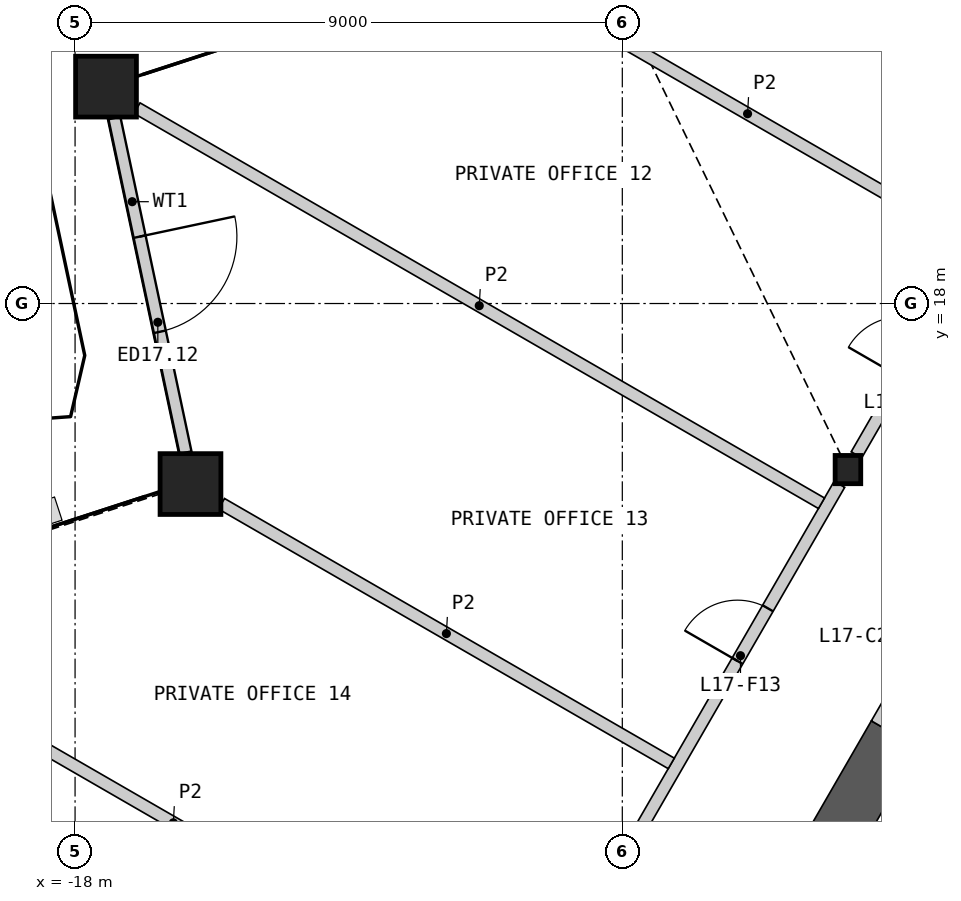
"""IFC4 building model, lengths in metres.
Left out: names, types, materials, properties, quantities, classifications, styles, units other than length and angle.
Written with IfcOpenShell. Run it as: python <this file> out.ifc"""

import sys

from ifc_helpers import new_model, si_unit, direction, frame, frame_2d, origin, origin_2d, place, context, subcontext, project, spatial, rectangle, hollow_rectangle, i_section, extrude, element, fill, save


model = new_model("IFC4")
c1 = context("Model", 3, precision=1e-05, world=origin(), true_north=direction((0.0, 1.0)))
c2 = subcontext(c1, "Body", "Model", "MODEL_VIEW")
j1 = project(units=[si_unit("LENGTHUNIT", "METRE"), si_unit("PLANEANGLEUNIT", "RADIAN")], contexts=[c1])
p1 = place(None, origin())
s1 = spatial("IfcSite", under=j1, at=p1, CompositionType="ELEMENT")
p2 = place(p1, origin())
s2 = spatial("IfcBuilding", under=s1, at=p2, CompositionType="ELEMENT")
p3 = place(p2, frame((0.0, 0.0, 80.4)))
s3 = spatial("IfcBuildingStorey", under=s2, at=p3, CompositionType="ELEMENT", Elevation=80.4)
for number, where, z_axis, x_axis in (
    (1, (-17.491, 21.567, 0.0), (0.0, 0.0, 1.0), (1.0, 0.0, 0.0)),
    (2, (-16.102, 15.031, 0.0), (0.0, 0.0, 1.0), (1.0, 0.0, 0.0)),
):
    element("IfcColumn", number, at=place(p3, frame(where, z_axis=z_axis, x_axis=x_axis)), inside=s3, PredefinedType="COLUMN", context=c2, shape_type="SweptSolid", body=[
        extrude(hollow_rectangle(XDim=1.0, YDim=1.0, WallThickness=0.07, at=origin_2d()), origin(), (0.0, 0.0, 1.0), 4.2),
    ])
p4 = place(p3, frame((-5.289, 15.269, 0.0), z_axis=(0.0, 0.0, 1.0), x_axis=(1.0, 0.0, 0.0)))
e3 = element("IfcColumn", 3, at=p4, inside=s3, PredefinedType="COLUMN", context=c2, shape_type="SweptSolid", body=[
    extrude(i_section(OverallWidth=0.421, OverallDepth=0.465, WebThickness=0.045, FlangeThickness=0.072, at=origin_2d()), origin(), (0.0, 0.0, 1.0), 4.2),
])
p5 = place(p3, frame((-17.353, 21.051, 0.0), z_axis=(0.0, 0.0, 1.0), x_axis=(0.207901831982, -0.978149696242, 0.0)))
e4 = element("IfcWall", 4, at=p5, inside=s3, PredefinedType="SOLIDWALL", context=c2, shape_type="SweptSolid", body=[
    extrude(rectangle(XDim=5.626, YDim=0.2, at=frame_2d((2.813, 0.0))), origin(), (0.0, 0.0, 1.0), 3.189),
])
p6 = place(p5, frame((1.994, 0.0, 0.0)))
e5 = element("IfcOpeningElement", 5, at=p6, cuts=e4, PredefinedType="OPENING", context=c2, shape_type="SweptSolid", body=[
    extrude(rectangle(XDim=1.6, YDim=2.4, at=frame_2d((0.8, 1.2))), frame((0.0, 0.11, 0.0), z_axis=(0.0, -1.0, 0.0), x_axis=(1.0, 0.0, 0.0)), (0.0, 0.0, 1.0), 0.22),
])
p7 = place(p3, frame((-4.514, 10.911, 0.0), z_axis=(0.0, 0.0, 1.0), x_axis=(-0.500006662879, -0.866021556935, 0.0)))
e6 = element("IfcWall", 6, at=p7, inside=s3, PredefinedType="SHEAR", context=c2, shape_type="SweptSolid", body=[
    extrude(rectangle(XDim=7.312, YDim=0.9, at=frame_2d((3.656, 0.0))), origin(), (0.0, 0.0, 1.0), 3.8),
])
p8 = place(p3, frame((-3.414, 12.816, 0.0), z_axis=(0.0, 0.0, 1.0), x_axis=(-0.50002983664, -0.866008176907, 0.0)))
e7 = element("IfcWall", 7, at=p8, inside=s3, PredefinedType="SHEAR", context=c2, shape_type="SweptSolid", body=[
    extrude(rectangle(XDim=2.2, YDim=0.9, at=frame_2d((1.1, 0.0))), origin(), (0.0, 0.0, 1.0), 3.8),
])
p9 = place(p8, frame((0.6, 0.0, 0.0)))
e8 = element("IfcOpeningElement", 8, at=p9, cuts=e7, PredefinedType="OPENING", context=c2, shape_type="SweptSolid", body=[
    extrude(rectangle(XDim=1.0, YDim=2.1, at=frame_2d((0.5, 1.05))), frame((0.0, 0.46, 0.0), z_axis=(0.0, -1.0, 0.0), x_axis=(1.0, 0.0, 0.0)), (0.0, 0.0, 1.0), 0.92),
])
p10 = place(p3, frame((-10.439, 6.35, 0.0), z_axis=(0.0, 0.0, 1.0), x_axis=(0.50001002959, 0.86601961312, 0.0)))
e9 = element("IfcWall", 9, at=p10, inside=s3, PredefinedType="PARTITIONING", context=c2, shape_type="SweptSolid", body=[
    extrude(rectangle(XDim=10.019, YDim=0.2, at=frame_2d((5.009, 0.0))), origin(), (0.0, 0.0, 1.0), 3.8),
])
p11 = place(p10, frame((6.664, 0.0, 0.0)))
e10 = element("IfcOpeningElement", 10, at=p11, cuts=e9, PredefinedType="OPENING", context=c2, shape_type="SweptSolid", body=[
    extrude(rectangle(XDim=1.0, YDim=2.1, at=frame_2d((0.5, 1.05))), frame((0.0, 0.11, 0.0), z_axis=(0.0, -1.0, 0.0), x_axis=(1.0, 0.0, 0.0)), (0.0, 0.0, 1.0), 0.22),
])
p12 = place(p10, frame((1.854, 0.0, 0.0)))
e11 = element("IfcOpeningElement", 11, at=p12, cuts=e9, PredefinedType="OPENING", context=c2, shape_type="SweptSolid", body=[
    extrude(rectangle(XDim=1.0, YDim=2.1, at=frame_2d((0.5, 1.05))), frame((0.0, 0.11, 0.0), z_axis=(0.0, -1.0, 0.0), x_axis=(1.0, 0.0, 0.0)), (0.0, 0.0, 1.0), 0.22),
])
p13 = place(p3, frame((-5.149, 15.511, 0.0), z_axis=(0.0, 0.0, 1.0), x_axis=(0.500001069878, 0.866024786089, 0.0)))
e12 = element("IfcWall", 12, at=p13, inside=s3, PredefinedType="PARTITIONING", context=c2, shape_type="SweptSolid", body=[
    extrude(rectangle(XDim=6.473, YDim=0.2, at=frame_2d((3.236, 0.0))), origin(), (0.0, 0.0, 1.0), 3.8),
])
p14 = place(p13, frame((4.715, 0.0, 0.0)))
e13 = element("IfcOpeningElement", 13, at=p14, cuts=e12, PredefinedType="OPENING", context=c2, shape_type="SweptSolid", body=[
    extrude(rectangle(XDim=1.0, YDim=2.1, at=frame_2d((0.5, 1.05))), frame((0.0, 0.11, 0.0), z_axis=(0.0, -1.0, 0.0), x_axis=(1.0, 0.0, 0.0)), (0.0, 0.0, 1.0), 0.22),
])
p15 = place(p13, frame((1.468, 0.0, 0.0)))
e14 = element("IfcOpeningElement", 14, at=p15, cuts=e12, PredefinedType="OPENING", context=c2, shape_type="SweptSolid", body=[
    extrude(rectangle(XDim=1.0, YDim=2.1, at=frame_2d((0.5, 1.05))), frame((0.0, 0.11, 0.0), z_axis=(0.0, -1.0, 0.0), x_axis=(1.0, 0.0, 0.0)), (0.0, 0.0, 1.0), 0.22),
])
p16 = place(p3, frame((-12.109, 29.659, 0.0), z_axis=(0.0, 0.0, 1.0), x_axis=(0.761767039776, -0.647851045465, 0.0)))
e15 = element("IfcWall", 15, at=p16, inside=s3, PredefinedType="PARTITIONING", context=c2, shape_type="SweptSolid", body=[
    extrude(rectangle(XDim=13.219, YDim=0.2, at=frame_2d((6.609, 0.0))), origin(), (0.0, 0.0, 1.0), 2.885),
])
p17 = place(p3, frame((-16.981, 21.213, 0.0), z_axis=(0.0, 0.0, 1.0), x_axis=(0.866032633092, -0.499987478263, 0.0)))
e16 = element("IfcWall", 16, at=p17, inside=s3, PredefinedType="PARTITIONING", context=c2, shape_type="SweptSolid", body=[
    extrude(rectangle(XDim=12.998, YDim=0.2, at=frame_2d((6.499, 0.0))), origin(), (0.0, 0.0, 1.0), 2.885),
])
p18 = place(p3, frame((-21.947, 12.671, 0.0), z_axis=(0.0, 0.0, 1.0), x_axis=(0.866026729935, -0.499997703033, 0.0)))
e17 = element("IfcWall", 17, at=p18, inside=s3, PredefinedType="PARTITIONING", context=c2, shape_type="SweptSolid", body=[
    extrude(rectangle(XDim=12.848, YDim=0.2, at=frame_2d((6.424, 0.0))), origin(), (0.0, 0.0, 1.0), 2.885),
])
p19 = place(p3, frame((-15.592, 14.707, 0.0), z_axis=(0.0, 0.0, 1.0), x_axis=(0.866032315796, -0.499988027854, 0.0)))
e18 = element("IfcWall", 18, at=p19, inside=s3, PredefinedType="PARTITIONING", context=c2, shape_type="SweptSolid", body=[
    extrude(rectangle(XDim=8.541, YDim=0.2, at=frame_2d((4.271, 0.0))), origin(), (0.0, 0.0, 1.0), 2.885),
])
p20 = place(p3, frame((-10.626, 23.249, 0.0), z_axis=(0.0, 0.0, 1.0), x_axis=(0.866037037334, -0.49997984956, 0.0)))
e19 = element("IfcWall", 19, at=p20, inside=s3, PredefinedType="PARTITIONING", context=c2, shape_type="SweptSolid", body=[
    extrude(rectangle(XDim=8.511, YDim=0.2, at=frame_2d((4.256, 0.0))), origin(), (0.0, 0.0, 1.0), 2.885),
])
p21 = place(p6, origin())
e20 = element("IfcDoor", 20, at=p21, inside=s3, OperationType="DOUBLE_DOOR_SINGLE_SWING", PredefinedType="DOOR", context=c2, shape_type="SweptSolid", body=[
    extrude(rectangle(XDim=1.6, YDim=2.4, at=frame_2d((0.8, 1.2))), frame((0.0, 0.025, 0.0), z_axis=(0.0, -1.0, 0.0), x_axis=(1.0, 0.0, 0.0)), (0.0, 0.0, 1.0), 0.05),
])
fill(e5, e20)
p22 = place(p11, origin())
e21 = element("IfcDoor", 21, at=p22, inside=s3, OperationType="SINGLE_SWING_LEFT", PredefinedType="DOOR", context=c2, shape_type="SweptSolid", body=[
    extrude(rectangle(XDim=1.0, YDim=2.1, at=frame_2d((0.5, 1.05))), frame((0.0, 0.025, 0.0), z_axis=(0.0, -1.0, 0.0), x_axis=(1.0, 0.0, 0.0)), (0.0, 0.0, 1.0), 0.05),
])
fill(e10, e21)
save(model, sys.argv[1])
